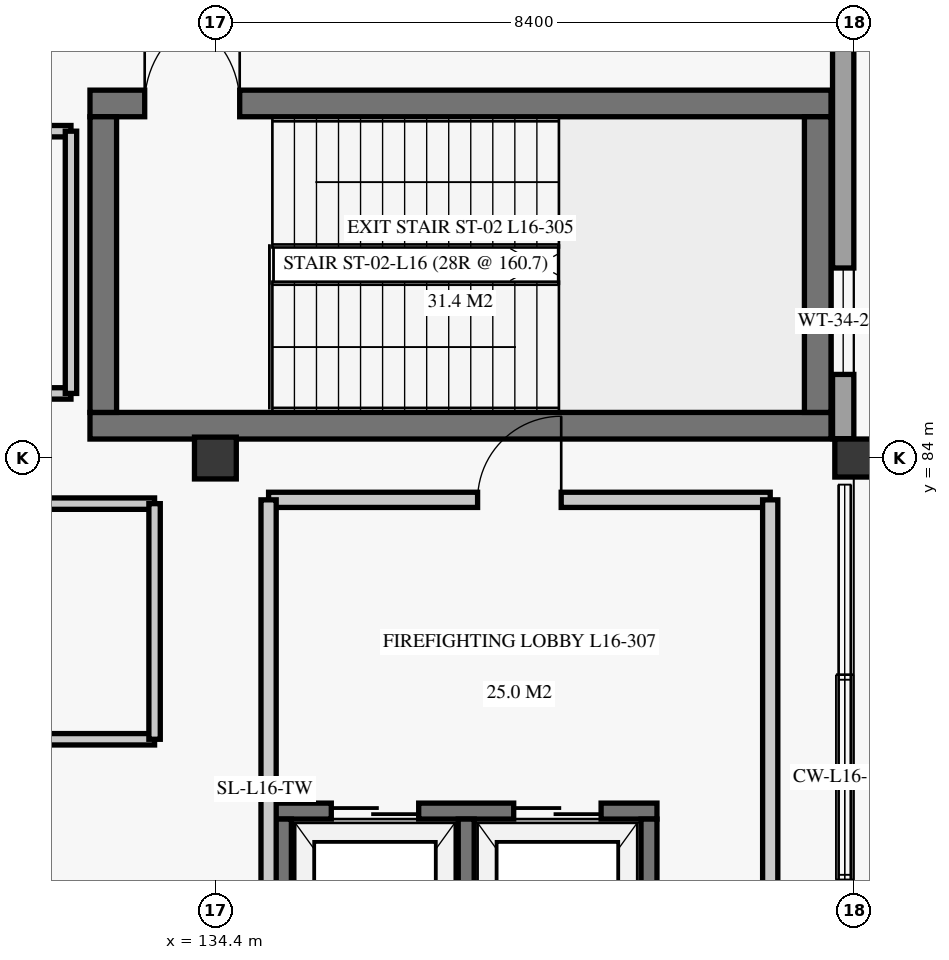
"""IFC4 building model, lengths in metres.
Left out: names, types, materials, properties, quantities, classifications, styles, units other than length and angle.
Written with IfcOpenShell. Run it as: python <this file> out.ifc"""

import sys

from ifc_helpers import new_model, si_unit, direction, frame, frame_2d, origin, origin_2d, place, context, subcontext, project, spatial, rectangle, extrude, element, fill, save


model = new_model("IFC4")
c1 = context("Model", 3, precision=1e-05, world=origin(), true_north=direction((0.0, 1.0)))
c2 = subcontext(c1, "Body", "Model", "MODEL_VIEW")
j1 = project(units=[si_unit("LENGTHUNIT", "METRE"), si_unit("PLANEANGLEUNIT", "RADIAN")], contexts=[c1])
p1 = place(None, origin())
s1 = spatial("IfcSite", under=j1, at=p1, CompositionType="ELEMENT")
p2 = place(p1, origin())
s2 = spatial("IfcBuilding", under=s1, at=p2, CompositionType="ELEMENT")
p3 = place(p2, frame((0.0, 0.0, 66.7)))
s3 = spatial("IfcBuildingStorey", under=s2, at=p3, CompositionType="ELEMENT", Elevation=66.7)
p4 = place(p3, frame((134.4, 84.0, 0.0), z_axis=(0.0, 0.0, 1.0), x_axis=(1.0, 0.0, 0.0)))
e1 = element("IfcColumn", 1, at=p4, inside=s3, PredefinedType="COLUMN", context=c2, shape_type="SweptSolid", body=[
    extrude(rectangle(XDim=0.55, YDim=0.55, at=origin_2d()), origin(), (0.0, 0.0, 1.0), 4.22),
])
p5 = place(p3, frame((142.8, 84.0, 0.0), z_axis=(0.0, 0.0, 1.0), x_axis=(1.0, 0.0, 0.0)))
e2 = element("IfcColumn", 2, at=p5, inside=s3, PredefinedType="COLUMN", context=c2, shape_type="SweptSolid", body=[
    extrude(rectangle(XDim=0.5, YDim=0.5, at=origin_2d()), origin(), (0.0, 0.0, 1.0), 4.22),
])
p6 = place(p3, frame((142.66, 84.254, 0.0), z_axis=(0.0, 0.0, 1.0), x_axis=(0.0, 1.0, 0.0)))
e3 = element("IfcWall", 3, at=p6, inside=s3, PredefinedType="SOLIDWALL", context=c2, shape_type="SweptSolid", body=[
    extrude(rectangle(XDim=7.868, YDim=0.28, at=frame_2d((3.934, 0.0))), origin(), (0.0, 0.0, 1.0), 3.54),
])
p7 = place(p6, frame((0.846, 0.0, 0.85)))
e4 = element("IfcOpeningElement", 4, at=p7, cuts=e3, PredefinedType="OPENING", context=c2, shape_type="SweptSolid", body=[
    extrude(rectangle(XDim=1.4, YDim=1.7, at=frame_2d((0.7, 0.85))), frame((0.0, 0.15, 0.0), z_axis=(0.0, -1.0, 0.0), x_axis=(1.0, 0.0, 0.0)), (0.0, 0.0, 1.0), 0.3),
])
p8 = place(p6, frame((5.196, 0.0, 0.0)))
e5 = element("IfcOpeningElement", 5, at=p8, cuts=e3, PredefinedType="OPENING", context=c2, shape_type="SweptSolid", body=[
    extrude(rectangle(XDim=1.68, YDim=2.3, at=frame_2d((0.84, 1.15))), frame((0.0, 0.15, 0.0), z_axis=(0.0, -1.0, 0.0), x_axis=(1.0, 0.0, 0.0)), (0.0, 0.0, 1.0), 0.3),
])
p9 = place(p3, frame((142.68, 75.73, 4.5), z_axis=(0.0, 0.0, 1.0), x_axis=(0.0, 1.0, 0.0)))
e6 = element("IfcWall", 6, at=p9, inside=s3, PredefinedType="SOLIDWALL", context=c2, shape_type="SweptSolid", body=[
    extrude(rectangle(XDim=8.14, YDim=0.23, at=frame_2d((4.07, 0.0))), origin(), (0.0, 0.0, 1.0), 3.15),
])
p10 = place(p9, frame((2.72, 0.0, 0.5)))
e7 = element("IfcOpeningElement", 7, at=p10, cuts=e6, PredefinedType="OPENING", context=c2, shape_type="SweptSolid", body=[
    extrude(rectangle(XDim=2.7, YDim=2.2, at=frame_2d((1.35, 1.1))), frame((0.0, 0.125, 0.0), z_axis=(0.0, -1.0, 0.0), x_axis=(1.0, 0.0, 0.0)), (0.0, 0.0, 1.0), 0.25),
])
p11 = place(p3, frame((142.68, 84.13, 4.5), z_axis=(0.0, 0.0, 1.0), x_axis=(0.0, 1.0, 0.0)))
e8 = element("IfcWall", 8, at=p11, inside=s3, PredefinedType="SOLIDWALL", context=c2, shape_type="SweptSolid", body=[
    extrude(rectangle(XDim=8.104, YDim=0.23, at=frame_2d((4.052, 0.0))), origin(), (0.0, 0.0, 1.0), 3.15),
])
p12 = place(p3, frame((132.75, 84.425, 0.0), z_axis=(0.0, 0.0, 1.0), x_axis=(1.0, 0.0, 0.0)))
e9 = element("IfcWall", 9, at=p12, inside=s3, PredefinedType="SHEAR", context=c2, shape_type="SweptSolid", body=[
    extrude(rectangle(XDim=9.75, YDim=0.35, at=frame_2d((4.875, 0.0))), origin(), (0.0, 0.0, 1.0), 4.22),
])
p13 = place(p3, frame((132.75, 88.665, 0.0), z_axis=(0.0, 0.0, 1.0), x_axis=(1.0, 0.0, 0.0)))
e10 = element("IfcWall", 10, at=p13, inside=s3, PredefinedType="SHEAR", context=c2, shape_type="SweptSolid", body=[
    extrude(rectangle(XDim=9.75, YDim=0.35, at=frame_2d((4.875, 0.0))), origin(), (0.0, 0.0, 1.0), 4.22),
])
p14 = place(p13, frame((0.72, 0.0, 0.0)))
e11 = element("IfcOpeningElement", 11, at=p14, cuts=e10, PredefinedType="OPENING", context=c2, shape_type="SweptSolid", body=[
    extrude(rectangle(XDim=1.25, YDim=2.2, at=frame_2d((0.625, 1.1))), frame((0.0, 0.185, 0.0), z_axis=(0.0, -1.0, 0.0), x_axis=(1.0, 0.0, 0.0)), (0.0, 0.0, 1.0), 0.37),
])
for number, where, z_axis, x_axis in (
    (12, (132.925, 84.6, 0.0), (0.0, 0.0, 1.0), (0.0, 1.0, 0.0)),
    (13, (142.325, 84.6, 0.0), (0.0, 0.0, 1.0), (0.0, 1.0, 0.0)),
):
    element("IfcWall", number, at=place(p3, frame(where, z_axis=z_axis, x_axis=x_axis)), inside=s3, PredefinedType="SHEAR", context=c2, shape_type="SweptSolid", body=[
        extrude(rectangle(XDim=3.89, YDim=0.35, at=frame_2d((1.945, 0.0))), origin(), (0.0, 0.0, 1.0), 4.22),
    ])
p15 = place(p3, frame((132.75, 84.425, 4.5), z_axis=(0.0, 0.0, 1.0), x_axis=(1.0, 0.0, 0.0)))
e14 = element("IfcWall", 14, at=p15, inside=s3, PredefinedType="SHEAR", context=c2, shape_type="SweptSolid", body=[
    extrude(rectangle(XDim=9.75, YDim=0.35, at=frame_2d((4.875, 0.0))), origin(), (0.0, 0.0, 1.0), 3.58),
])
p16 = place(p3, frame((132.75, 88.665, 4.5), z_axis=(0.0, 0.0, 1.0), x_axis=(1.0, 0.0, 0.0)))
e15 = element("IfcWall", 15, at=p16, inside=s3, PredefinedType="SHEAR", context=c2, shape_type="SweptSolid", body=[
    extrude(rectangle(XDim=9.75, YDim=0.35, at=frame_2d((4.875, 0.0))), origin(), (0.0, 0.0, 1.0), 3.58),
])
p17 = place(p16, frame((0.72, 0.0, 0.0)))
e16 = element("IfcOpeningElement", 16, at=p17, cuts=e15, PredefinedType="OPENING", context=c2, shape_type="SweptSolid", body=[
    extrude(rectangle(XDim=1.25, YDim=2.2, at=frame_2d((0.625, 1.1))), frame((0.0, 0.185, 0.0), z_axis=(0.0, -1.0, 0.0), x_axis=(1.0, 0.0, 0.0)), (0.0, 0.0, 1.0), 0.37),
])
for number, where, z_axis, x_axis in (
    (17, (132.925, 84.6, 4.5), (0.0, 0.0, 1.0), (0.0, 1.0, 0.0)),
    (18, (142.325, 84.6, 4.5), (0.0, 0.0, 1.0), (0.0, 1.0, 0.0)),
):
    element("IfcWall", number, at=place(p3, frame(where, z_axis=z_axis, x_axis=x_axis)), inside=s3, PredefinedType="SHEAR", context=c2, shape_type="SweptSolid", body=[
        extrude(rectangle(XDim=3.89, YDim=0.35, at=frame_2d((1.945, 0.0))), origin(), (0.0, 0.0, 1.0), 3.58),
    ])
p18 = place(p3, frame((135.19, 79.355, 0.0), z_axis=(0.0, 0.0, 1.0), x_axis=(1.0, 0.0, 0.0)))
e19 = element("IfcWall", 19, at=p18, inside=s3, PredefinedType="SHEAR", context=c2, shape_type="SweptSolid", body=[
    extrude(rectangle(XDim=5.02, YDim=0.21, at=frame_2d((2.51, 0.0))), origin(), (0.0, 0.0, 1.0), 4.22),
])
p19 = place(p18, frame((0.735, 0.0, 0.0)))
e20 = element("IfcOpeningElement", 20, at=p19, cuts=e19, PredefinedType="OPENING", context=c2, shape_type="SweptSolid", body=[
    extrude(rectangle(XDim=1.15, YDim=2.2, at=frame_2d((0.575, 1.1))), frame((0.0, 0.115, 0.0), z_axis=(0.0, -1.0, 0.0), x_axis=(1.0, 0.0, 0.0)), (0.0, 0.0, 1.0), 0.23),
])
p20 = place(p18, frame((3.135, 0.0, 0.0)))
e21 = element("IfcOpeningElement", 21, at=p20, cuts=e19, PredefinedType="OPENING", context=c2, shape_type="SweptSolid", body=[
    extrude(rectangle(XDim=1.15, YDim=2.2, at=frame_2d((0.575, 1.1))), frame((0.0, 0.115, 0.0), z_axis=(0.0, -1.0, 0.0), x_axis=(1.0, 0.0, 0.0)), (0.0, 0.0, 1.0), 0.23),
])
for number, where, z_axis, x_axis in (
    (22, (135.295, 76.25, 0.0), (0.0, 0.0, 1.0), (0.0, 1.0, 0.0)),
    (23, (140.105, 76.25, 0.0), (0.0, 0.0, 1.0), (0.0, 1.0, 0.0)),
    (24, (137.7, 76.25, 0.0), (0.0, 0.0, 1.0), (0.0, 1.0, 0.0)),
):
    element("IfcWall", number, at=place(p3, frame(where, z_axis=z_axis, x_axis=x_axis)), inside=s3, PredefinedType="SHEAR", context=c2, shape_type="SweptSolid", body=[
        extrude(rectangle(XDim=3.0, YDim=0.21, at=frame_2d((1.5, 0.0))), origin(), (0.0, 0.0, 1.0), 4.22),
    ])
p21 = place(p3, frame((135.1, 83.45, 0.0), z_axis=(0.0, 0.0, 1.0), x_axis=(1.0, 0.0, 0.0)))
e25 = element("IfcWall", 25, at=p21, inside=s3, PredefinedType="PARTITIONING", context=c2, shape_type="SweptSolid", body=[
    extrude(rectangle(XDim=6.6, YDim=0.2, at=frame_2d((3.3, 0.0))), origin(), (0.0, 0.0, 1.0), 3.84),
])
p22 = place(p21, frame((2.75, 0.0, 0.0)))
e26 = element("IfcOpeningElement", 26, at=p22, cuts=e25, PredefinedType="OPENING", context=c2, shape_type="SweptSolid", body=[
    extrude(rectangle(XDim=1.1, YDim=2.2, at=frame_2d((0.55, 1.1))), frame((0.0, 0.11, 0.0), z_axis=(0.0, -1.0, 0.0), x_axis=(1.0, 0.0, 0.0)), (0.0, 0.0, 1.0), 0.22),
])
for number, where, z_axis, x_axis in (
    (27, (135.1, 76.2, 0.0), (0.0, 0.0, 1.0), (0.0, 1.0, 0.0)),
    (28, (141.7, 76.2, 0.0), (0.0, 0.0, 1.0), (0.0, 1.0, 0.0)),
):
    element("IfcWall", number, at=place(p3, frame(where, z_axis=z_axis, x_axis=x_axis)), inside=s3, PredefinedType="PARTITIONING", context=c2, shape_type="SweptSolid", body=[
        extrude(rectangle(XDim=7.25, YDim=0.2, at=frame_2d((3.625, 0.0))), origin(), (0.0, 0.0, 1.0), 3.84),
    ])
p23 = place(p3, frame((129.1, 80.3, 0.0), z_axis=(0.0, 0.0, 1.0), x_axis=(1.0, 0.0, 0.0)))
e29 = element("IfcWall", 29, at=p23, inside=s3, PredefinedType="PARTITIONING", context=c2, shape_type="SweptSolid", body=[
    extrude(rectangle(XDim=4.5, YDim=0.15, at=frame_2d((2.25, 0.0))), origin(), (0.0, 0.0, 1.0), 3.84),
])
p24 = place(p23, frame((1.65, 0.0, 0.0)))
e30 = element("IfcOpeningElement", 30, at=p24, cuts=e29, PredefinedType="OPENING", context=c2, shape_type="SweptSolid", body=[
    extrude(rectangle(XDim=1.0, YDim=2.1, at=frame_2d((0.5, 1.05))), frame((0.0, 0.085, 0.0), z_axis=(0.0, -1.0, 0.0), x_axis=(1.0, 0.0, 0.0)), (0.0, 0.0, 1.0), 0.17),
])
p25 = place(p3, frame((129.1, 83.4, 0.0), z_axis=(0.0, 0.0, 1.0), x_axis=(1.0, 0.0, 0.0)))
e31 = element("IfcWall", 31, at=p25, inside=s3, PredefinedType="PARTITIONING", context=c2, shape_type="SweptSolid", body=[
    extrude(rectangle(XDim=4.5, YDim=0.15, at=frame_2d((2.25, 0.0))), origin(), (0.0, 0.0, 1.0), 3.84),
])
p26 = place(p3, frame((133.6, 80.3, 0.0), z_axis=(0.0, 0.0, 1.0), x_axis=(0.0, 1.0, 0.0)))
e32 = element("IfcWall", 32, at=p26, inside=s3, PredefinedType="PARTITIONING", context=c2, shape_type="SweptSolid", body=[
    extrude(rectangle(XDim=3.1, YDim=0.15, at=frame_2d((1.55, 0.0))), origin(), (0.0, 0.0, 1.0), 3.84),
])
p27 = place(p3, frame((128.7, 88.3, 0.0), z_axis=(0.0, 0.0, 1.0), x_axis=(1.0, 0.0, 0.0)))
e33 = element("IfcWall", 33, at=p27, inside=s3, PredefinedType="PARTITIONING", context=c2, shape_type="SweptSolid", body=[
    extrude(rectangle(XDim=3.8, YDim=0.15, at=frame_2d((1.9, 0.0))), origin(), (0.0, 0.0, 1.0), 3.84),
])
p28 = place(p27, frame((1.35, 0.0, 0.0)))
e34 = element("IfcOpeningElement", 34, at=p28, cuts=e33, PredefinedType="OPENING", context=c2, shape_type="SweptSolid", body=[
    extrude(rectangle(XDim=1.05, YDim=2.15, at=frame_2d((0.525, 1.075))), frame((0.0, 0.085, 0.0), z_axis=(0.0, -1.0, 0.0), x_axis=(1.0, 0.0, 0.0)), (0.0, 0.0, 1.0), 0.17),
])
p29 = place(p3, frame((128.7, 84.85, 0.0), z_axis=(0.0, 0.0, 1.0), x_axis=(1.0, 0.0, 0.0)))
e35 = element("IfcWall", 35, at=p29, inside=s3, PredefinedType="PARTITIONING", context=c2, shape_type="SweptSolid", body=[
    extrude(rectangle(XDim=3.8, YDim=0.15, at=frame_2d((1.9, 0.0))), origin(), (0.0, 0.0, 1.0), 3.84),
])
p30 = place(p3, frame((132.5, 84.85, 0.0), z_axis=(0.0, 0.0, 1.0), x_axis=(0.0, 1.0, 0.0)))
e36 = element("IfcWall", 36, at=p30, inside=s3, PredefinedType="PARTITIONING", context=c2, shape_type="SweptSolid", body=[
    extrude(rectangle(XDim=3.45, YDim=0.15, at=frame_2d((1.725, 0.0))), origin(), (0.0, 0.0, 1.0), 3.84),
])
p31 = place(p7, origin())
e37 = element("IfcWindow", 37, at=p31, inside=s3, PartitioningType="SINGLE_PANEL", PredefinedType="WINDOW", context=c2, shape_type="SweptSolid", body=[
    extrude(rectangle(XDim=1.4, YDim=1.7, at=frame_2d((0.7, 0.85))), frame((0.0, 0.03, 0.0), z_axis=(0.0, -1.0, 0.0), x_axis=(1.0, 0.0, 0.0)), (0.0, 0.0, 1.0), 0.06),
])
fill(e4, e37)
p32 = place(p10, origin())
e38 = element("IfcWindow", 38, at=p32, inside=s3, PartitioningType="SINGLE_PANEL", PredefinedType="WINDOW", context=c2, shape_type="SweptSolid", body=[
    extrude(rectangle(XDim=2.7, YDim=2.2, at=frame_2d((1.35, 1.1))), frame((0.0, 0.03, 0.0), z_axis=(0.0, -1.0, 0.0), x_axis=(1.0, 0.0, 0.0)), (0.0, 0.0, 1.0), 0.06),
])
fill(e7, e38)
p33 = place(p14, origin())
e39 = element("IfcDoor", 39, at=p33, inside=s3, OperationType="SINGLE_SWING_RIGHT", PredefinedType="DOOR", context=c2, shape_type="SweptSolid", body=[
    extrude(rectangle(XDim=1.25, YDim=2.2, at=frame_2d((0.625, 1.1))), frame((0.0, 0.025, 0.0), z_axis=(0.0, -1.0, 0.0), x_axis=(1.0, 0.0, 0.0)), (0.0, 0.0, 1.0), 0.05),
])
fill(e11, e39)
p34 = place(p17, origin())
e40 = element("IfcDoor", 40, at=p34, inside=s3, OperationType="SINGLE_SWING_LEFT", PredefinedType="DOOR", context=c2, shape_type="SweptSolid", body=[
    extrude(rectangle(XDim=1.25, YDim=2.2, at=frame_2d((0.625, 1.1))), frame((0.0, 0.025, 0.0), z_axis=(0.0, -1.0, 0.0), x_axis=(1.0, 0.0, 0.0)), (0.0, 0.0, 1.0), 0.05),
])
fill(e16, e40)
p35 = place(p19, origin())
e41 = element("IfcDoor", 41, at=p35, inside=s3, OperationType="DOUBLE_DOOR_SLIDING", PredefinedType="DOOR", context=c2, shape_type="SweptSolid", body=[
    extrude(rectangle(XDim=1.15, YDim=2.2, at=frame_2d((0.575, 1.1))), frame((0.0, 0.025, 0.0), z_axis=(0.0, -1.0, 0.0), x_axis=(1.0, 0.0, 0.0)), (0.0, 0.0, 1.0), 0.05),
])
fill(e20, e41)
p36 = place(p20, origin())
e42 = element("IfcDoor", 42, at=p36, inside=s3, OperationType="DOUBLE_DOOR_SLIDING", PredefinedType="DOOR", context=c2, shape_type="SweptSolid", body=[
    extrude(rectangle(XDim=1.15, YDim=2.2, at=frame_2d((0.575, 1.1))), frame((0.0, 0.025, 0.0), z_axis=(0.0, -1.0, 0.0), x_axis=(1.0, 0.0, 0.0)), (0.0, 0.0, 1.0), 0.05),
])
fill(e21, e42)
p37 = place(p22, origin())
e43 = element("IfcDoor", 43, at=p37, inside=s3, OperationType="SINGLE_SWING_RIGHT", PredefinedType="DOOR", context=c2, shape_type="SweptSolid", body=[
    extrude(rectangle(XDim=1.1, YDim=2.2, at=frame_2d((0.55, 1.1))), frame((0.0, 0.025, 0.0), z_axis=(0.0, -1.0, 0.0), x_axis=(1.0, 0.0, 0.0)), (0.0, 0.0, 1.0), 0.05),
])
fill(e26, e43)
save(model, sys.argv[1])
